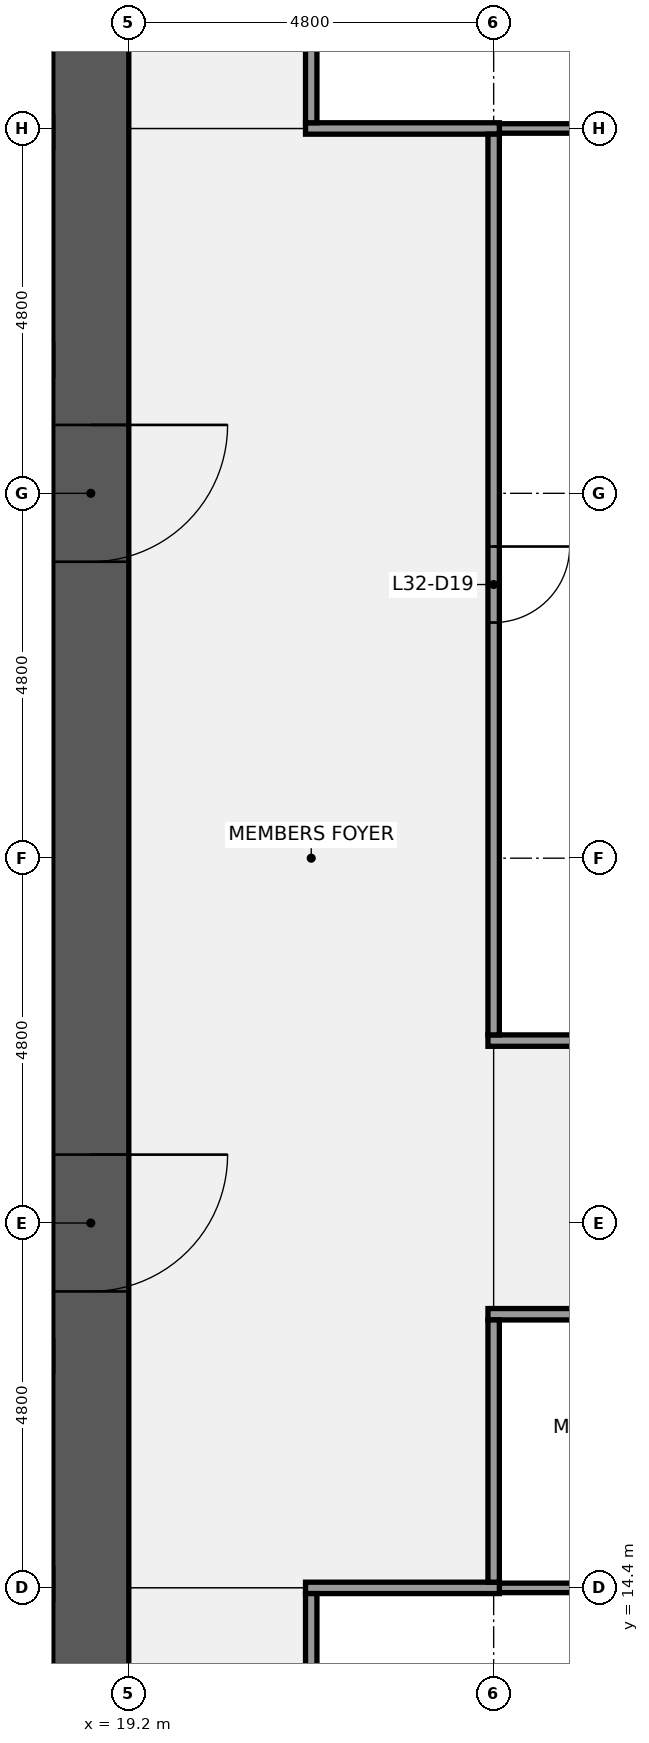
"""IFC4 building model, lengths in metres.
Left out: names, types, materials, properties, quantities, classifications, styles, units other than length and angle.
Written with IfcOpenShell. Run it as: python <this file> out.ifc"""

import sys

from ifc_helpers import new_model, si_unit, direction, frame, frame_2d, origin, place, context, subcontext, project, spatial, rectangle, extrude, element, fill, save


model = new_model("IFC4")
c1 = context("Model", 3, precision=1e-05, world=origin(), true_north=direction((0.0, 1.0)))
c2 = subcontext(c1, "Body", "Model", "MODEL_VIEW")
j1 = project(units=[si_unit("LENGTHUNIT", "METRE"), si_unit("PLANEANGLEUNIT", "RADIAN")], contexts=[c1])
p1 = place(None, origin())
s1 = spatial("IfcSite", under=j1, at=p1, CompositionType="ELEMENT")
p2 = place(p1, origin())
s2 = spatial("IfcBuilding", under=s1, at=p2, CompositionType="ELEMENT")
p3 = place(p2, frame((0.0, 0.0, 148.1)))
s3 = spatial("IfcBuildingStorey", under=s2, at=p3, CompositionType="ELEMENT", Elevation=148.1)
p4 = place(p3, frame((18.7, 38.4, 0.0), z_axis=(0.0, 0.0, 1.0), x_axis=(0.0, -1.0, 0.0)))
e1 = element("IfcWall", 1, at=p4, inside=s3, PredefinedType="SHEAR", context=c2, shape_type="SweptSolid", body=[
    extrude(rectangle(XDim=28.8, YDim=1.0, at=frame_2d((14.4, 0.0))), origin(), (0.0, 0.0, 1.0), 3.84),
])
p5 = place(p4, frame((18.3, 0.0, 0.0)))
e2 = element("IfcOpeningElement", 2, at=p5, cuts=e1, PredefinedType="OPENING", context=c2, shape_type="SweptSolid", body=[
    extrude(rectangle(XDim=1.8, YDim=2.1, at=frame_2d((0.9, 1.05))), frame((0.0, 0.51, 0.0), z_axis=(0.0, -1.0, 0.0), x_axis=(1.0, 0.0, 0.0)), (0.0, 0.0, 1.0), 1.02),
])
p6 = place(p4, frame((8.7, 0.0, 0.0)))
e3 = element("IfcOpeningElement", 3, at=p6, cuts=e1, PredefinedType="OPENING", context=c2, shape_type="SweptSolid", body=[
    extrude(rectangle(XDim=1.8, YDim=2.1, at=frame_2d((0.9, 1.05))), frame((0.0, 0.51, 0.0), z_axis=(0.0, -1.0, 0.0), x_axis=(1.0, 0.0, 0.0)), (0.0, 0.0, 1.0), 1.02),
])
p7 = place(p3, frame((1.0, 14.45, 0.0), z_axis=(0.0, 0.0, 1.0), x_axis=(1.0, 0.0, 0.0)))
e4 = element("IfcWall", 4, at=p7, inside=s3, PredefinedType="SHEAR", context=c2, shape_type="SweptSolid", body=[
    extrude(rectangle(XDim=17.2, YDim=0.4, at=frame_2d((8.6, 0.0))), origin(), (0.0, 0.0, 1.0), 3.84),
])
p8 = place(p3, frame((1.0, 17.45, 0.0), z_axis=(0.0, 0.0, 1.0), x_axis=(1.0, 0.0, 0.0)))
e5 = element("IfcWall", 5, at=p8, inside=s3, PredefinedType="SHEAR", context=c2, shape_type="SweptSolid", body=[
    extrude(rectangle(XDim=17.2, YDim=0.4, at=frame_2d((8.6, 0.0))), origin(), (0.0, 0.0, 1.0), 3.84),
])
p9 = place(p8, frame((0.762, 0.0, 0.0)))
e6 = element("IfcOpeningElement", 6, at=p9, cuts=e5, PredefinedType="OPENING", context=c2, shape_type="SweptSolid", body=[
    extrude(rectangle(XDim=1.0, YDim=2.1, at=frame_2d((0.5, 1.05))), frame((0.0, 0.21, 0.0), z_axis=(0.0, -1.0, 0.0), x_axis=(1.0, 0.0, 0.0)), (0.0, 0.0, 1.0), 0.42),
])
p10 = place(p8, frame((3.3, 0.0, 0.0)))
e7 = element("IfcOpeningElement", 7, at=p10, cuts=e5, PredefinedType="OPENING", context=c2, shape_type="SweptSolid", body=[
    extrude(rectangle(XDim=1.0, YDim=2.1, at=frame_2d((0.5, 1.05))), frame((0.0, 0.21, 0.0), z_axis=(0.0, -1.0, 0.0), x_axis=(1.0, 0.0, 0.0)), (0.0, 0.0, 1.0), 0.42),
])
p11 = place(p8, frame((7.5, 0.0, 0.0)))
e8 = element("IfcOpeningElement", 8, at=p11, cuts=e5, PredefinedType="OPENING", context=c2, shape_type="SweptSolid", body=[
    extrude(rectangle(XDim=1.0, YDim=2.1, at=frame_2d((0.5, 1.05))), frame((0.0, 0.21, 0.0), z_axis=(0.0, -1.0, 0.0), x_axis=(1.0, 0.0, 0.0)), (0.0, 0.0, 1.0), 0.42),
])
p12 = place(p8, frame((12.0, 0.0, 0.0)))
e9 = element("IfcOpeningElement", 9, at=p12, cuts=e5, PredefinedType="OPENING", context=c2, shape_type="SweptSolid", body=[
    extrude(rectangle(XDim=1.0, YDim=2.1, at=frame_2d((0.5, 1.05))), frame((0.0, 0.21, 0.0), z_axis=(0.0, -1.0, 0.0), x_axis=(1.0, 0.0, 0.0)), (0.0, 0.0, 1.0), 0.42),
])
p13 = place(p8, frame((15.137, 0.0, 0.0)))
e10 = element("IfcOpeningElement", 10, at=p13, cuts=e5, PredefinedType="OPENING", context=c2, shape_type="SweptSolid", body=[
    extrude(rectangle(XDim=1.0, YDim=2.1, at=frame_2d((0.5, 1.05))), frame((0.0, 0.21, 0.0), z_axis=(0.0, -1.0, 0.0), x_axis=(1.0, 0.0, 0.0)), (0.0, 0.0, 1.0), 0.42),
])
p14 = place(p3, frame((1.0, 30.55, 0.0), z_axis=(0.0, 0.0, 1.0), x_axis=(1.0, 0.0, 0.0)))
e11 = element("IfcWall", 11, at=p14, inside=s3, PredefinedType="SHEAR", context=c2, shape_type="SweptSolid", body=[
    extrude(rectangle(XDim=17.2, YDim=0.4, at=frame_2d((8.6, 0.0))), origin(), (0.0, 0.0, 1.0), 3.84),
])
p15 = place(p14, frame((0.762, 0.0, 0.0)))
e12 = element("IfcOpeningElement", 12, at=p15, cuts=e11, PredefinedType="OPENING", context=c2, shape_type="SweptSolid", body=[
    extrude(rectangle(XDim=1.0, YDim=2.1, at=frame_2d((0.5, 1.05))), frame((0.0, 0.21, 0.0), z_axis=(0.0, -1.0, 0.0), x_axis=(1.0, 0.0, 0.0)), (0.0, 0.0, 1.0), 0.42),
])
p16 = place(p14, frame((3.3, 0.0, 0.0)))
e13 = element("IfcOpeningElement", 13, at=p16, cuts=e11, PredefinedType="OPENING", context=c2, shape_type="SweptSolid", body=[
    extrude(rectangle(XDim=1.0, YDim=2.1, at=frame_2d((0.5, 1.05))), frame((0.0, 0.21, 0.0), z_axis=(0.0, -1.0, 0.0), x_axis=(1.0, 0.0, 0.0)), (0.0, 0.0, 1.0), 0.42),
])
p17 = place(p14, frame((7.5, 0.0, 0.0)))
e14 = element("IfcOpeningElement", 14, at=p17, cuts=e11, PredefinedType="OPENING", context=c2, shape_type="SweptSolid", body=[
    extrude(rectangle(XDim=1.0, YDim=2.1, at=frame_2d((0.5, 1.05))), frame((0.0, 0.21, 0.0), z_axis=(0.0, -1.0, 0.0), x_axis=(1.0, 0.0, 0.0)), (0.0, 0.0, 1.0), 0.42),
])
p18 = place(p14, frame((12.0, 0.0, 0.0)))
e15 = element("IfcOpeningElement", 15, at=p18, cuts=e11, PredefinedType="OPENING", context=c2, shape_type="SweptSolid", body=[
    extrude(rectangle(XDim=1.0, YDim=2.1, at=frame_2d((0.5, 1.05))), frame((0.0, 0.21, 0.0), z_axis=(0.0, -1.0, 0.0), x_axis=(1.0, 0.0, 0.0)), (0.0, 0.0, 1.0), 0.42),
])
p19 = place(p14, frame((15.137, 0.0, 0.0)))
e16 = element("IfcOpeningElement", 16, at=p19, cuts=e11, PredefinedType="OPENING", context=c2, shape_type="SweptSolid", body=[
    extrude(rectangle(XDim=1.0, YDim=2.1, at=frame_2d((0.5, 1.05))), frame((0.0, 0.21, 0.0), z_axis=(0.0, -1.0, 0.0), x_axis=(1.0, 0.0, 0.0)), (0.0, 0.0, 1.0), 0.42),
])
p20 = place(p3, frame((1.0, 33.55, 0.0), z_axis=(0.0, 0.0, 1.0), x_axis=(1.0, 0.0, 0.0)))
e17 = element("IfcWall", 17, at=p20, inside=s3, PredefinedType="SHEAR", context=c2, shape_type="SweptSolid", body=[
    extrude(rectangle(XDim=17.2, YDim=0.4, at=frame_2d((8.6, 0.0))), origin(), (0.0, 0.0, 1.0), 3.84),
])
p21 = place(p3, frame((24.075, 14.4, 0.0), z_axis=(0.0, 0.0, 1.0), x_axis=(1.0, 0.0, 0.0)))
e18 = element("IfcWall", 18, at=p21, inside=s3, PredefinedType="PARTITIONING", context=c2, shape_type="SweptSolid", body=[
    extrude(rectangle(XDim=9.6, YDim=0.125, at=frame_2d((4.8, 0.0))), origin(), (0.0, 0.0, 1.0), 2.849),
])
p22 = place(p3, frame((21.525, 14.4, 0.0), z_axis=(0.0, 0.0, 1.0), x_axis=(1.0, 0.0, 0.0)))
e19 = element("IfcWall", 19, at=p22, inside=s3, PredefinedType="PARTITIONING", context=c2, shape_type="SweptSolid", body=[
    extrude(rectangle(XDim=2.55, YDim=0.15, at=frame_2d((1.275, 0.0))), origin(), (0.0, 0.0, 1.0), 2.849),
])
p23 = place(p3, frame((23.925, 18.0, 0.0), z_axis=(0.0, 0.0, 1.0), x_axis=(1.0, 0.0, 0.0)))
e20 = element("IfcWall", 20, at=p23, inside=s3, PredefinedType="PARTITIONING", context=c2, shape_type="SweptSolid", body=[
    extrude(rectangle(XDim=9.75, YDim=0.15, at=frame_2d((4.875, 0.0))), origin(), (0.0, 0.0, 1.0), 2.849),
])
p24 = place(p23, frame((1.375, 0.0, 0.0)))
e21 = element("IfcOpeningElement", 21, at=p24, cuts=e20, PredefinedType="OPENING", context=c2, shape_type="SweptSolid", body=[
    extrude(rectangle(XDim=1.0, YDim=2.1, at=frame_2d((0.5, 1.05))), frame((0.0, 0.085, 0.0), z_axis=(0.0, -1.0, 0.0), x_axis=(1.0, 0.0, 0.0)), (0.0, 0.0, 1.0), 0.17),
])
p25 = place(p23, frame((6.175, 0.0, 0.0)))
e22 = element("IfcOpeningElement", 22, at=p25, cuts=e20, PredefinedType="OPENING", context=c2, shape_type="SweptSolid", body=[
    extrude(rectangle(XDim=1.0, YDim=2.1, at=frame_2d((0.5, 1.05))), frame((0.0, 0.085, 0.0), z_axis=(0.0, -1.0, 0.0), x_axis=(1.0, 0.0, 0.0)), (0.0, 0.0, 1.0), 0.17),
])
p26 = place(p3, frame((23.925, 21.6, 0.0), z_axis=(0.0, 0.0, 1.0), x_axis=(1.0, 0.0, 0.0)))
e23 = element("IfcWall", 23, at=p26, inside=s3, PredefinedType="PARTITIONING", context=c2, shape_type="SweptSolid", body=[
    extrude(rectangle(XDim=9.75, YDim=0.15, at=frame_2d((4.875, 0.0))), origin(), (0.0, 0.0, 1.0), 2.849),
])
p27 = place(p3, frame((24.075, 33.6, 0.0), z_axis=(0.0, 0.0, 1.0), x_axis=(1.0, 0.0, 0.0)))
e24 = element("IfcWall", 24, at=p27, inside=s3, PredefinedType="PARTITIONING", context=c2, shape_type="SweptSolid", body=[
    extrude(rectangle(XDim=9.6, YDim=0.125, at=frame_2d((4.8, 0.0))), origin(), (0.0, 0.0, 1.0), 2.849),
])
p28 = place(p3, frame((21.525, 33.6, 0.0), z_axis=(0.0, 0.0, 1.0), x_axis=(1.0, 0.0, 0.0)))
e25 = element("IfcWall", 25, at=p28, inside=s3, PredefinedType="PARTITIONING", context=c2, shape_type="SweptSolid", body=[
    extrude(rectangle(XDim=2.55, YDim=0.15, at=frame_2d((1.275, 0.0))), origin(), (0.0, 0.0, 1.0), 2.849),
])
for number, where, z_axis, x_axis in (
    (26, (21.6, 9.675, 0.0), (0.0, 0.0, 1.0), (0.0, 1.0, 0.0)),
    (27, (21.6, 33.675, 0.0), (0.0, 0.0, 1.0), (0.0, 1.0, 0.0)),
):
    element("IfcWall", number, at=place(p3, frame(where, z_axis=z_axis, x_axis=x_axis)), inside=s3, PredefinedType="PARTITIONING", context=c2, shape_type="SweptSolid", body=[
        extrude(rectangle(XDim=4.65, YDim=0.15, at=frame_2d((2.325, 0.0))), origin(), (0.0, 0.0, 1.0), 2.849),
    ])
p29 = place(p3, frame((24.0, 14.475, 0.0), z_axis=(0.0, 0.0, 1.0), x_axis=(0.0, 1.0, 0.0)))
e28 = element("IfcWall", 28, at=p29, inside=s3, PredefinedType="PARTITIONING", context=c2, shape_type="SweptSolid", body=[
    extrude(rectangle(XDim=3.45, YDim=0.15, at=frame_2d((1.725, 0.0))), origin(), (0.0, 0.0, 1.0), 2.849),
])
p30 = place(p3, frame((24.0, 21.675, 0.0), z_axis=(0.0, 0.0, 1.0), x_axis=(0.0, 1.0, 0.0)))
e29 = element("IfcWall", 29, at=p30, inside=s3, PredefinedType="PARTITIONING", context=c2, shape_type="SweptSolid", body=[
    extrude(rectangle(XDim=11.85, YDim=0.15, at=frame_2d((5.925, 0.0))), origin(), (0.0, 0.0, 1.0), 2.849),
])
p31 = place(p30, frame((5.425, 0.0, 0.0)))
e30 = element("IfcOpeningElement", 30, at=p31, cuts=e29, PredefinedType="OPENING", context=c2, shape_type="SweptSolid", body=[
    extrude(rectangle(XDim=1.0, YDim=2.1, at=frame_2d((0.5, 1.05))), frame((0.0, 0.085, 0.0), z_axis=(0.0, -1.0, 0.0), x_axis=(1.0, 0.0, 0.0)), (0.0, 0.0, 1.0), 0.17),
])
p32 = place(p5, origin())
e31 = element("IfcDoor", 31, at=p32, inside=s3, OperationType="DOUBLE_DOOR_SINGLE_SWING", PredefinedType="DOOR", context=c2, shape_type="SweptSolid", body=[
    extrude(rectangle(XDim=1.8, YDim=2.1, at=frame_2d((0.9, 1.05))), frame((0.0, 0.025, 0.0), z_axis=(0.0, -1.0, 0.0), x_axis=(1.0, 0.0, 0.0)), (0.0, 0.0, 1.0), 0.05),
])
fill(e2, e31)
p33 = place(p6, origin())
e32 = element("IfcDoor", 32, at=p33, inside=s3, OperationType="DOUBLE_DOOR_SINGLE_SWING", PredefinedType="DOOR", context=c2, shape_type="SweptSolid", body=[
    extrude(rectangle(XDim=1.8, YDim=2.1, at=frame_2d((0.9, 1.05))), frame((0.0, 0.025, 0.0), z_axis=(0.0, -1.0, 0.0), x_axis=(1.0, 0.0, 0.0)), (0.0, 0.0, 1.0), 0.05),
])
fill(e3, e32)
p34 = place(p31, origin())
e33 = element("IfcDoor", 33, at=p34, inside=s3, OperationType="SINGLE_SWING_RIGHT", PredefinedType="DOOR", context=c2, shape_type="SweptSolid", body=[
    extrude(rectangle(XDim=1.0, YDim=2.1, at=frame_2d((0.5, 1.05))), frame((0.0, 0.025, 0.0), z_axis=(0.0, -1.0, 0.0), x_axis=(1.0, 0.0, 0.0)), (0.0, 0.0, 1.0), 0.05),
])
fill(e30, e33)
save(model, sys.argv[1])
